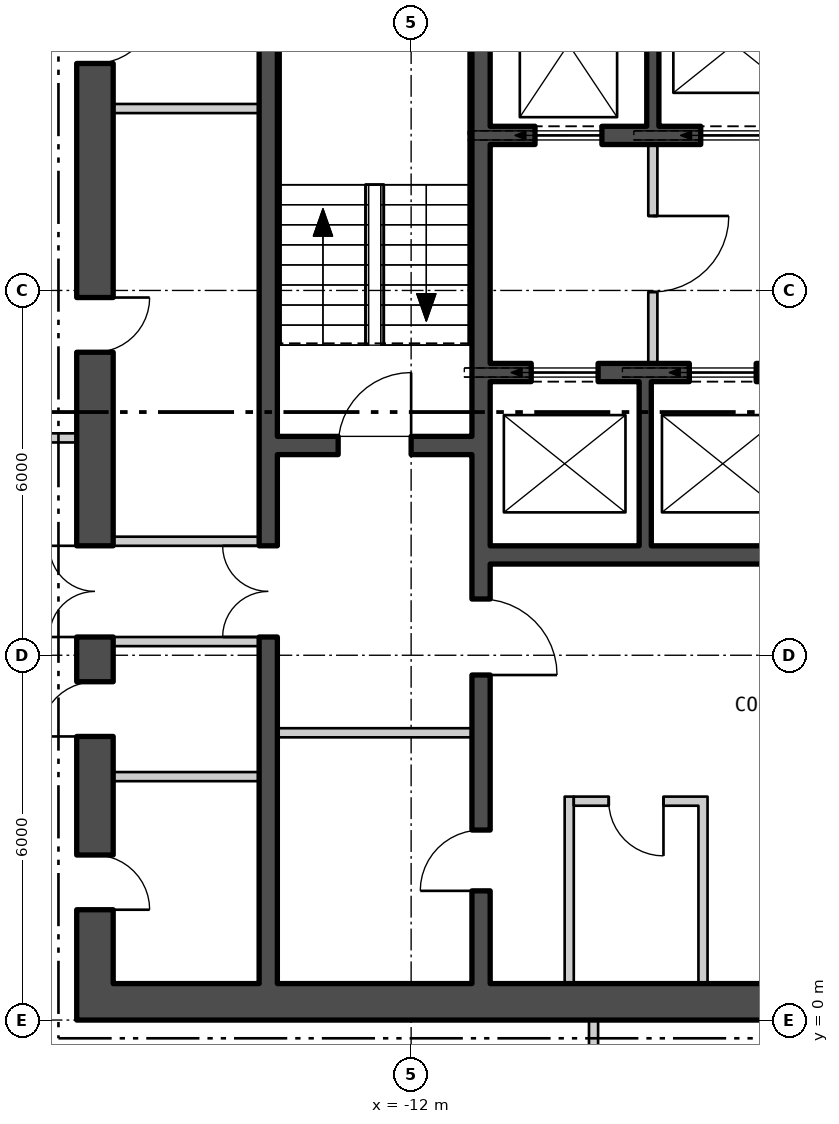
"""IFC4 building model, lengths in metres.
Left out: names, types, materials, properties, quantities, classifications, styles, units other than length and angle.
Written with IfcOpenShell. Run it as: python <this file> out.ifc"""

import sys

from ifc_helpers import new_model, si_unit, direction, frame, frame_2d, origin, place, context, subcontext, project, spatial, rectangle, extrude, element, fill, save


model = new_model("IFC4")
c1 = context("Model", 3, precision=1e-05, world=origin(), true_north=direction((0.0, 1.0)))
c2 = subcontext(c1, "Body", "Model", "MODEL_VIEW")
j1 = project(units=[si_unit("LENGTHUNIT", "METRE"), si_unit("PLANEANGLEUNIT", "RADIAN")], contexts=[c1])
p1 = place(None, origin())
s1 = spatial("IfcSite", under=j1, at=p1, CompositionType="ELEMENT")
p2 = place(p1, origin())
s2 = spatial("IfcBuilding", under=s1, at=p2, CompositionType="ELEMENT")
p3 = place(p2, frame((0.0, 0.0, 8.4)))
s3 = spatial("IfcBuildingStorey", under=s2, at=p3, CompositionType="ELEMENT", Elevation=8.4)
p4 = place(p3, frame((-17.5, 0.3, 0.0), z_axis=(0.0, 0.0, 1.0), x_axis=(1.0, 0.0, 0.0)))
e1 = element("IfcWall", 1, at=p4, inside=s3, PredefinedType="SHEAR", context=c2, shape_type="SweptSolid", body=[
    extrude(rectangle(XDim=35.0, YDim=0.6, at=frame_2d((17.5, 0.0))), origin(), (0.0, 0.0, 1.0), 4.88),
])
p5 = place(p4, frame((12.0, 0.0, 0.0)))
e2 = element("IfcOpeningElement", 2, at=p5, cuts=e1, PredefinedType="OPENING", context=c2, shape_type="SweptSolid", body=[
    extrude(rectangle(XDim=1.8, YDim=2.4, at=frame_2d((0.9, 1.2))), frame((0.0, 0.31, 0.0), z_axis=(0.0, -1.0, 0.0), x_axis=(1.0, 0.0, 0.0)), (0.0, 0.0, 1.0), 0.62),
])
p6 = place(p4, frame((22.0, 0.0, 0.0)))
e3 = element("IfcOpeningElement", 3, at=p6, cuts=e1, PredefinedType="OPENING", context=c2, shape_type="SweptSolid", body=[
    extrude(rectangle(XDim=1.8, YDim=2.4, at=frame_2d((0.9, 1.2))), frame((0.0, 0.31, 0.0), z_axis=(0.0, -1.0, 0.0), x_axis=(1.0, 0.0, 0.0)), (0.0, 0.0, 1.0), 0.62),
])
p7 = place(p3, frame((-17.2, 0.6, 0.0), z_axis=(0.0, 0.0, 1.0), x_axis=(0.0, 1.0, 0.0)))
e4 = element("IfcWall", 4, at=p7, inside=s3, PredefinedType="SHEAR", context=c2, shape_type="SweptSolid", body=[
    extrude(rectangle(XDim=16.8, YDim=0.6, at=frame_2d((8.4, 0.0))), origin(), (0.0, 0.0, 1.0), 4.88),
])
p8 = place(p7, frame((5.7, 0.0, 0.0)))
e5 = element("IfcOpeningElement", 5, at=p8, cuts=e4, PredefinedType="OPENING", context=c2, shape_type="SweptSolid", body=[
    extrude(rectangle(XDim=1.5, YDim=2.1, at=frame_2d((0.75, 1.05))), frame((0.0, 0.31, 0.0), z_axis=(0.0, -1.0, 0.0), x_axis=(1.0, 0.0, 0.0)), (0.0, 0.0, 1.0), 0.62),
])
p9 = place(p7, frame((1.214, 0.0, 0.0)))
e6 = element("IfcOpeningElement", 6, at=p9, cuts=e4, PredefinedType="OPENING", context=c2, shape_type="SweptSolid", body=[
    extrude(rectangle(XDim=0.9, YDim=2.1, at=frame_2d((0.45, 1.05))), frame((0.0, 0.31, 0.0), z_axis=(0.0, -1.0, 0.0), x_axis=(1.0, 0.0, 0.0)), (0.0, 0.0, 1.0), 0.62),
])
p10 = place(p7, frame((4.064, 0.0, 0.0)))
e7 = element("IfcOpeningElement", 7, at=p10, cuts=e4, PredefinedType="OPENING", context=c2, shape_type="SweptSolid", body=[
    extrude(rectangle(XDim=0.9, YDim=2.1, at=frame_2d((0.45, 1.05))), frame((0.0, 0.31, 0.0), z_axis=(0.0, -1.0, 0.0), x_axis=(1.0, 0.0, 0.0)), (0.0, 0.0, 1.0), 0.62),
])
p11 = place(p7, frame((10.383, 0.0, 0.0)))
e8 = element("IfcOpeningElement", 8, at=p11, cuts=e4, PredefinedType="OPENING", context=c2, shape_type="SweptSolid", body=[
    extrude(rectangle(XDim=0.9, YDim=2.1, at=frame_2d((0.45, 1.05))), frame((0.0, 0.31, 0.0), z_axis=(0.0, -1.0, 0.0), x_axis=(1.0, 0.0, 0.0)), (0.0, 0.0, 1.0), 0.62),
])
p12 = place(p7, frame((15.133, 0.0, 0.0)))
e9 = element("IfcOpeningElement", 9, at=p12, cuts=e4, PredefinedType="OPENING", context=c2, shape_type="SweptSolid", body=[
    extrude(rectangle(XDim=1.0, YDim=2.1, at=frame_2d((0.5, 1.05))), frame((0.0, 0.31, 0.0), z_axis=(0.0, -1.0, 0.0), x_axis=(1.0, 0.0, 0.0)), (0.0, 0.0, 1.0), 0.62),
])
p13 = place(p3, frame((-10.85, 0.6, 0.0), z_axis=(0.0, 0.0, 1.0), x_axis=(0.0, 1.0, 0.0)))
e10 = element("IfcWall", 10, at=p13, inside=s3, PredefinedType="SHEAR", context=c2, shape_type="SweptSolid", body=[
    extrude(rectangle(XDim=16.8, YDim=0.3, at=frame_2d((8.4, 0.0))), origin(), (0.0, 0.0, 1.0), 4.88),
])
p14 = place(p13, frame((5.075, 0.0, 0.0)))
e11 = element("IfcOpeningElement", 11, at=p14, cuts=e10, PredefinedType="OPENING", context=c2, shape_type="SweptSolid", body=[
    extrude(rectangle(XDim=1.25, YDim=2.1, at=frame_2d((0.625, 1.05))), frame((0.0, 0.16, 0.0), z_axis=(0.0, -1.0, 0.0), x_axis=(1.0, 0.0, 0.0)), (0.0, 0.0, 1.0), 0.32),
])
p15 = place(p13, frame((1.525, 0.0, 0.0)))
e12 = element("IfcOpeningElement", 12, at=p15, cuts=e10, PredefinedType="OPENING", context=c2, shape_type="SweptSolid", body=[
    extrude(rectangle(XDim=1.0, YDim=2.1, at=frame_2d((0.5, 1.05))), frame((0.0, 0.16, 0.0), z_axis=(0.0, -1.0, 0.0), x_axis=(1.0, 0.0, 0.0)), (0.0, 0.0, 1.0), 0.32),
])
p16 = place(p3, frame((-14.35, 0.6, 0.0), z_axis=(0.0, 0.0, 1.0), x_axis=(0.0, 1.0, 0.0)))
e13 = element("IfcWall", 13, at=p16, inside=s3, PredefinedType="SHEAR", context=c2, shape_type="SweptSolid", body=[
    extrude(rectangle(XDim=16.8, YDim=0.3, at=frame_2d((8.4, 0.0))), origin(), (0.0, 0.0, 1.0), 4.88),
])
p17 = place(p16, frame((5.7, 0.0, 0.0)))
e14 = element("IfcOpeningElement", 14, at=p17, cuts=e13, PredefinedType="OPENING", context=c2, shape_type="SweptSolid", body=[
    extrude(rectangle(XDim=1.5, YDim=2.1, at=frame_2d((0.75, 1.05))), frame((0.0, 0.16, 0.0), z_axis=(0.0, -1.0, 0.0), x_axis=(1.0, 0.0, 0.0)), (0.0, 0.0, 1.0), 0.32),
])
p18 = place(p3, frame((-14.2, 9.45, 0.0), z_axis=(0.0, 0.0, 1.0), x_axis=(1.0, 0.0, 0.0)))
e15 = element("IfcWall", 15, at=p18, inside=s3, PredefinedType="SHEAR", context=c2, shape_type="SweptSolid", body=[
    extrude(rectangle(XDim=3.2, YDim=0.3, at=frame_2d((1.6, 0.0))), origin(), (0.0, 0.0, 1.0), 4.88),
])
p19 = place(p18, frame((1.0, 0.0, 0.0)))
e16 = element("IfcOpeningElement", 16, at=p19, cuts=e15, PredefinedType="OPENING", context=c2, shape_type="SweptSolid", body=[
    extrude(rectangle(XDim=1.2, YDim=2.1, at=frame_2d((0.6, 1.05))), frame((0.0, 0.16, 0.0), z_axis=(0.0, -1.0, 0.0), x_axis=(1.0, 0.0, 0.0)), (0.0, 0.0, 1.0), 0.32),
])
p20 = place(p3, frame((-10.7, 14.55, 0.0), z_axis=(0.0, 0.0, 1.0), x_axis=(1.0, 0.0, 0.0)))
e17 = element("IfcWall", 17, at=p20, inside=s3, PredefinedType="SHEAR", context=c2, shape_type="SweptSolid", body=[
    extrude(rectangle(XDim=21.4, YDim=0.3, at=frame_2d((10.7, 0.0))), origin(), (0.0, 0.0, 1.0), 4.88),
])
p21 = place(p20, frame((0.738, 0.0, 0.0)))
e18 = element("IfcOpeningElement", 18, at=p21, cuts=e17, PredefinedType="OPENING", context=c2, shape_type="SweptSolid", body=[
    extrude(rectangle(XDim=1.1, YDim=2.1, at=frame_2d((0.55, 1.05))), frame((0.0, 0.16, 0.0), z_axis=(0.0, -1.0, 0.0), x_axis=(1.0, 0.0, 0.0)), (0.0, 0.0, 1.0), 0.32),
])
p22 = place(p20, frame((3.462, 0.0, 0.0)))
e19 = element("IfcOpeningElement", 19, at=p22, cuts=e17, PredefinedType="OPENING", context=c2, shape_type="SweptSolid", body=[
    extrude(rectangle(XDim=1.1, YDim=2.1, at=frame_2d((0.55, 1.05))), frame((0.0, 0.16, 0.0), z_axis=(0.0, -1.0, 0.0), x_axis=(1.0, 0.0, 0.0)), (0.0, 0.0, 1.0), 0.32),
])
p23 = place(p20, frame((6.138, 0.0, 0.0)))
e20 = element("IfcOpeningElement", 20, at=p23, cuts=e17, PredefinedType="OPENING", context=c2, shape_type="SweptSolid", body=[
    extrude(rectangle(XDim=1.1, YDim=2.1, at=frame_2d((0.55, 1.05))), frame((0.0, 0.16, 0.0), z_axis=(0.0, -1.0, 0.0), x_axis=(1.0, 0.0, 0.0)), (0.0, 0.0, 1.0), 0.32),
])
p24 = place(p20, frame((8.812, 0.0, 0.0)))
e21 = element("IfcOpeningElement", 21, at=p24, cuts=e17, PredefinedType="OPENING", context=c2, shape_type="SweptSolid", body=[
    extrude(rectangle(XDim=1.1, YDim=2.1, at=frame_2d((0.55, 1.05))), frame((0.0, 0.16, 0.0), z_axis=(0.0, -1.0, 0.0), x_axis=(1.0, 0.0, 0.0)), (0.0, 0.0, 1.0), 0.32),
])
p25 = place(p20, frame((14.162, 0.0, 0.0)))
e22 = element("IfcOpeningElement", 22, at=p25, cuts=e17, PredefinedType="OPENING", context=c2, shape_type="SweptSolid", body=[
    extrude(rectangle(XDim=1.1, YDim=2.1, at=frame_2d((0.55, 1.05))), frame((0.0, 0.16, 0.0), z_axis=(0.0, -1.0, 0.0), x_axis=(1.0, 0.0, 0.0)), (0.0, 0.0, 1.0), 0.32),
])
p26 = place(p20, frame((16.837, 0.0, 0.0)))
e23 = element("IfcOpeningElement", 23, at=p26, cuts=e17, PredefinedType="OPENING", context=c2, shape_type="SweptSolid", body=[
    extrude(rectangle(XDim=1.1, YDim=2.1, at=frame_2d((0.55, 1.05))), frame((0.0, 0.16, 0.0), z_axis=(0.0, -1.0, 0.0), x_axis=(1.0, 0.0, 0.0)), (0.0, 0.0, 1.0), 0.32),
])
p27 = place(p20, frame((19.562, 0.0, 0.0)))
e24 = element("IfcOpeningElement", 24, at=p27, cuts=e17, PredefinedType="OPENING", context=c2, shape_type="SweptSolid", body=[
    extrude(rectangle(XDim=1.1, YDim=2.1, at=frame_2d((0.55, 1.05))), frame((0.0, 0.16, 0.0), z_axis=(0.0, -1.0, 0.0), x_axis=(1.0, 0.0, 0.0)), (0.0, 0.0, 1.0), 0.32),
])
p28 = place(p3, frame((-10.7, 10.65, 0.0), z_axis=(0.0, 0.0, 1.0), x_axis=(1.0, 0.0, 0.0)))
e25 = element("IfcWall", 25, at=p28, inside=s3, PredefinedType="SHEAR", context=c2, shape_type="SweptSolid", body=[
    extrude(rectangle(XDim=10.3, YDim=0.3, at=frame_2d((5.15, 0.0))), origin(), (0.0, 0.0, 1.0), 4.88),
])
p29 = place(p28, frame((0.675, 0.0, 0.0)))
e26 = element("IfcOpeningElement", 26, at=p29, cuts=e25, PredefinedType="OPENING", context=c2, shape_type="SweptSolid", body=[
    extrude(rectangle(XDim=1.1, YDim=2.1, at=frame_2d((0.55, 1.05))), frame((0.0, 0.16, 0.0), z_axis=(0.0, -1.0, 0.0), x_axis=(1.0, 0.0, 0.0)), (0.0, 0.0, 1.0), 0.32),
])
p30 = place(p28, frame((3.275, 0.0, 0.0)))
e27 = element("IfcOpeningElement", 27, at=p30, cuts=e25, PredefinedType="OPENING", context=c2, shape_type="SweptSolid", body=[
    extrude(rectangle(XDim=1.1, YDim=2.1, at=frame_2d((0.55, 1.05))), frame((0.0, 0.16, 0.0), z_axis=(0.0, -1.0, 0.0), x_axis=(1.0, 0.0, 0.0)), (0.0, 0.0, 1.0), 0.32),
])
p31 = place(p28, frame((5.825, 0.0, 0.0)))
e28 = element("IfcOpeningElement", 28, at=p31, cuts=e25, PredefinedType="OPENING", context=c2, shape_type="SweptSolid", body=[
    extrude(rectangle(XDim=1.1, YDim=2.1, at=frame_2d((0.55, 1.05))), frame((0.0, 0.16, 0.0), z_axis=(0.0, -1.0, 0.0), x_axis=(1.0, 0.0, 0.0)), (0.0, 0.0, 1.0), 0.32),
])
p32 = place(p28, frame((8.375, 0.0, 0.0)))
e29 = element("IfcOpeningElement", 29, at=p32, cuts=e25, PredefinedType="OPENING", context=c2, shape_type="SweptSolid", body=[
    extrude(rectangle(XDim=1.1, YDim=2.1, at=frame_2d((0.55, 1.05))), frame((0.0, 0.16, 0.0), z_axis=(0.0, -1.0, 0.0), x_axis=(1.0, 0.0, 0.0)), (0.0, 0.0, 1.0), 0.32),
])
p33 = place(p3, frame((-10.7, 7.65, 0.0), z_axis=(0.0, 0.0, 1.0), x_axis=(1.0, 0.0, 0.0)))
e30 = element("IfcWall", 30, at=p33, inside=s3, PredefinedType="SHEAR", context=c2, shape_type="SweptSolid", body=[
    extrude(rectangle(XDim=10.3, YDim=0.3, at=frame_2d((5.15, 0.0))), origin(), (0.0, 0.0, 1.0), 4.88),
])
for number, where, z_axis, x_axis in (
    (31, (-8.025, 14.7, 0.0), (0.0, 0.0, 1.0), (0.0, 1.0, 0.0)),
    (32, (-8.15, 7.8, 0.0), (0.0, 0.0, 1.0), (0.0, 1.0, 0.0)),
):
    element("IfcWall", number, at=place(p3, frame(where, z_axis=z_axis, x_axis=x_axis)), inside=s3, PredefinedType="SHEAR", context=c2, shape_type="SweptSolid", body=[
        extrude(rectangle(XDim=2.7, YDim=0.2, at=frame_2d((1.35, 0.0))), origin(), (0.0, 0.0, 1.0), 4.88),
    ])
p34 = place(p3, frame((-8.025, 10.8, 0.0), z_axis=(0.0, 0.0, 1.0), x_axis=(0.0, 1.0, 0.0)))
e33 = element("IfcWall", 33, at=p34, inside=s3, PredefinedType="PARTITIONING", context=c2, shape_type="SweptSolid", body=[
    extrude(rectangle(XDim=3.6, YDim=0.15, at=frame_2d((1.8, 0.0))), origin(), (0.0, 0.0, 1.0), 4.88),
])
p35 = place(p34, frame((1.175, 0.0, 0.0)))
e34 = element("IfcOpeningElement", 34, at=p35, cuts=e33, PredefinedType="OPENING", context=c2, shape_type="SweptSolid", body=[
    extrude(rectangle(XDim=1.25, YDim=2.1, at=frame_2d((0.625, 1.05))), frame((0.0, 0.085, 0.0), z_axis=(0.0, -1.0, 0.0), x_axis=(1.0, 0.0, 0.0)), (0.0, 0.0, 1.0), 0.17),
])
p36 = place(p3, frame((-14.2, 4.725, 0.0), z_axis=(0.0, 0.0, 1.0), x_axis=(1.0, 0.0, 0.0)))
e35 = element("IfcWall", 35, at=p36, inside=s3, PredefinedType="PARTITIONING", context=c2, shape_type="SweptSolid", body=[
    extrude(rectangle(XDim=3.2, YDim=0.15, at=frame_2d((1.6, 0.0))), origin(), (0.0, 0.0, 1.0), 4.88),
])
for number, where, z_axis, x_axis in (
    (36, (-16.9, 6.225, 0.0), (0.0, 0.0, 1.0), (1.0, 0.0, 0.0)),
    (37, (-16.9, 7.875, 0.0), (0.0, 0.0, 1.0), (1.0, 0.0, 0.0)),
    (38, (-16.9, 4.004, 0.0), (0.0, 0.0, 1.0), (1.0, 0.0, 0.0)),
    (39, (-16.9, 14.992, 0.0), (0.0, 0.0, 1.0), (1.0, 0.0, 0.0)),
):
    element("IfcWall", number, at=place(p3, frame(where, z_axis=z_axis, x_axis=x_axis)), inside=s3, PredefinedType="PARTITIONING", context=c2, shape_type="SweptSolid", body=[
        extrude(rectangle(XDim=2.4, YDim=0.15, at=frame_2d((1.2, 0.0))), origin(), (0.0, 0.0, 1.0), 4.88),
    ])
for number, where, z_axis, x_axis in (
    (40, (-9.4, 0.6, 0.0), (0.0, 0.0, 1.0), (0.0, 1.0, 0.0)),
    (41, (-7.2, 0.6, 0.0), (0.0, 0.0, 1.0), (0.0, 1.0, 0.0)),
):
    element("IfcWall", number, at=place(p3, frame(where, z_axis=z_axis, x_axis=x_axis)), inside=s3, PredefinedType="PARTITIONING", context=c2, shape_type="SweptSolid", body=[
        extrude(rectangle(XDim=3.075, YDim=0.15, at=frame_2d((1.538, 0.0))), origin(), (0.0, 0.0, 1.0), 4.88),
    ])
p37 = place(p3, frame((-9.325, 3.6, 0.0), z_axis=(0.0, 0.0, 1.0), x_axis=(1.0, 0.0, 0.0)))
e42 = element("IfcWall", 42, at=p37, inside=s3, PredefinedType="PARTITIONING", context=c2, shape_type="SweptSolid", body=[
    extrude(rectangle(XDim=2.05, YDim=0.15, at=frame_2d((1.025, 0.0))), origin(), (0.0, 0.0, 1.0), 4.88),
])
p38 = place(p37, frame((0.575, 0.0, 0.0)))
e43 = element("IfcOpeningElement", 43, at=p38, cuts=e42, PredefinedType="OPENING", context=c2, shape_type="SweptSolid", body=[
    extrude(rectangle(XDim=0.9, YDim=2.1, at=frame_2d((0.45, 1.05))), frame((0.0, 0.085, 0.0), z_axis=(0.0, -1.0, 0.0), x_axis=(1.0, 0.0, 0.0)), (0.0, 0.0, 1.0), 0.17),
])
p39 = place(p3, frame((-19.825, 9.575, 0.0), z_axis=(0.0, 0.0, 1.0), x_axis=(1.0, 0.0, 0.0)))
e44 = element("IfcWall", 44, at=p39, inside=s3, PredefinedType="PARTITIONING", context=c2, shape_type="SweptSolid", body=[
    extrude(rectangle(XDim=2.325, YDim=0.15, at=frame_2d((1.163, 0.0))), origin(), (0.0, 0.0, 1.0), 4.88),
])
p40 = place(p39, frame((0.662, 0.0, 0.0)))
e45 = element("IfcOpeningElement", 45, at=p40, cuts=e44, PredefinedType="OPENING", context=c2, shape_type="SweptSolid", body=[
    extrude(rectangle(XDim=1.0, YDim=2.1, at=frame_2d((0.5, 1.05))), frame((0.0, 0.085, 0.0), z_axis=(0.0, -1.0, 0.0), x_axis=(1.0, 0.0, 0.0)), (0.0, 0.0, 1.0), 0.17),
])
p41 = place(p3, frame((-9.0, -13.675, 0.0), z_axis=(0.0, 0.0, 1.0), x_axis=(0.0, 1.0, 0.0)))
e46 = element("IfcWall", 46, at=p41, inside=s3, PredefinedType="PARTITIONING", context=c2, shape_type="SweptSolid", body=[
    extrude(rectangle(XDim=13.675, YDim=0.15, at=frame_2d((6.838, 0.0))), origin(), (0.0, 0.0, 1.0), 4.88),
])
p42 = place(p41, frame((11.969, 0.0, 0.0)))
e47 = element("IfcOpeningElement", 47, at=p42, cuts=e46, PredefinedType="OPENING", context=c2, shape_type="SweptSolid", body=[
    extrude(rectangle(XDim=1.0, YDim=2.1, at=frame_2d((0.5, 1.05))), frame((0.0, 0.085, 0.0), z_axis=(0.0, -1.0, 0.0), x_axis=(1.0, 0.0, 0.0)), (0.0, 0.0, 1.0), 0.17),
])
p43 = place(p21, origin())
e48 = element("IfcDoor", 48, at=p43, inside=s3, OperationType="SLIDING_TO_LEFT", PredefinedType="DOOR", context=c2, shape_type="SweptSolid", body=[
    extrude(rectangle(XDim=1.1, YDim=2.1, at=frame_2d((0.55, 1.05))), frame((0.0, 0.025, 0.0), z_axis=(0.0, -1.0, 0.0), x_axis=(1.0, 0.0, 0.0)), (0.0, 0.0, 1.0), 0.05),
])
fill(e18, e48)
p44 = place(p22, origin())
e49 = element("IfcDoor", 49, at=p44, inside=s3, OperationType="SLIDING_TO_LEFT", PredefinedType="DOOR", context=c2, shape_type="SweptSolid", body=[
    extrude(rectangle(XDim=1.1, YDim=2.1, at=frame_2d((0.55, 1.05))), frame((0.0, 0.025, 0.0), z_axis=(0.0, -1.0, 0.0), x_axis=(1.0, 0.0, 0.0)), (0.0, 0.0, 1.0), 0.05),
])
fill(e19, e49)
p45 = place(p29, origin())
e50 = element("IfcDoor", 50, at=p45, inside=s3, OperationType="SLIDING_TO_LEFT", PredefinedType="DOOR", context=c2, shape_type="SweptSolid", body=[
    extrude(rectangle(XDim=1.1, YDim=2.1, at=frame_2d((0.55, 1.05))), frame((0.0, 0.025, 0.0), z_axis=(0.0, -1.0, 0.0), x_axis=(1.0, 0.0, 0.0)), (0.0, 0.0, 1.0), 0.05),
])
fill(e26, e50)
p46 = place(p30, origin())
e51 = element("IfcDoor", 51, at=p46, inside=s3, OperationType="SLIDING_TO_LEFT", PredefinedType="DOOR", context=c2, shape_type="SweptSolid", body=[
    extrude(rectangle(XDim=1.1, YDim=2.1, at=frame_2d((0.55, 1.05))), frame((0.0, 0.025, 0.0), z_axis=(0.0, -1.0, 0.0), x_axis=(1.0, 0.0, 0.0)), (0.0, 0.0, 1.0), 0.05),
])
fill(e27, e51)
p47 = place(p35, origin())
e52 = element("IfcDoor", 52, at=p47, inside=s3, OperationType="SINGLE_SWING_RIGHT", PredefinedType="DOOR", context=c2, shape_type="SweptSolid", body=[
    extrude(rectangle(XDim=1.25, YDim=2.1, at=frame_2d((0.625, 1.05))), frame((0.0, 0.025, 0.0), z_axis=(0.0, -1.0, 0.0), x_axis=(1.0, 0.0, 0.0)), (0.0, 0.0, 1.0), 0.05),
])
fill(e34, e52)
p48 = place(p19, origin())
e53 = element("IfcDoor", 53, at=p48, inside=s3, OperationType="SINGLE_SWING_LEFT", PredefinedType="DOOR", context=c2, shape_type="SweptSolid", body=[
    extrude(rectangle(XDim=1.2, YDim=2.1, at=frame_2d((0.6, 1.05))), frame((0.0, 0.025, 0.0), z_axis=(0.0, -1.0, 0.0), x_axis=(1.0, 0.0, 0.0)), (0.0, 0.0, 1.0), 0.05),
])
fill(e16, e53)
p49 = place(p14, origin())
e54 = element("IfcDoor", 54, at=p49, inside=s3, OperationType="SINGLE_SWING_LEFT", PredefinedType="DOOR", context=c2, shape_type="SweptSolid", body=[
    extrude(rectangle(XDim=1.25, YDim=2.1, at=frame_2d((0.625, 1.05))), frame((0.0, 0.025, 0.0), z_axis=(0.0, -1.0, 0.0), x_axis=(1.0, 0.0, 0.0)), (0.0, 0.0, 1.0), 0.05),
])
fill(e11, e54)
p50 = place(p15, origin())
e55 = element("IfcDoor", 55, at=p50, inside=s3, OperationType="SINGLE_SWING_RIGHT", PredefinedType="DOOR", context=c2, shape_type="SweptSolid", body=[
    extrude(rectangle(XDim=1.0, YDim=2.1, at=frame_2d((0.5, 1.05))), frame((0.0, 0.025, 0.0), z_axis=(0.0, -1.0, 0.0), x_axis=(1.0, 0.0, 0.0)), (0.0, 0.0, 1.0), 0.05),
])
fill(e12, e55)
p51 = place(p17, origin())
e56 = element("IfcDoor", 56, at=p51, inside=s3, OperationType="DOUBLE_DOOR_SINGLE_SWING", PredefinedType="DOOR", context=c2, shape_type="SweptSolid", body=[
    extrude(rectangle(XDim=1.5, YDim=2.1, at=frame_2d((0.75, 1.05))), frame((0.0, 0.025, 0.0), z_axis=(0.0, -1.0, 0.0), x_axis=(1.0, 0.0, 0.0)), (0.0, 0.0, 1.0), 0.05),
])
fill(e14, e56)
p52 = place(p8, origin())
e57 = element("IfcDoor", 57, at=p52, inside=s3, OperationType="DOUBLE_DOOR_SINGLE_SWING", PredefinedType="DOOR", context=c2, shape_type="SweptSolid", body=[
    extrude(rectangle(XDim=1.5, YDim=2.1, at=frame_2d((0.75, 1.05))), frame((0.0, 0.025, 0.0), z_axis=(0.0, -1.0, 0.0), x_axis=(1.0, 0.0, 0.0)), (0.0, 0.0, 1.0), 0.05),
])
fill(e5, e57)
p53 = place(p9, origin())
e58 = element("IfcDoor", 58, at=p53, inside=s3, OperationType="SINGLE_SWING_LEFT", PredefinedType="DOOR", context=c2, shape_type="SweptSolid", body=[
    extrude(rectangle(XDim=0.9, YDim=2.1, at=frame_2d((0.45, 1.05))), frame((0.0, 0.025, 0.0), z_axis=(0.0, -1.0, 0.0), x_axis=(1.0, 0.0, 0.0)), (0.0, 0.0, 1.0), 0.05),
])
fill(e6, e58)
p54 = place(p10, origin())
e59 = element("IfcDoor", 59, at=p54, inside=s3, OperationType="SINGLE_SWING_RIGHT", PredefinedType="DOOR", context=c2, shape_type="SweptSolid", body=[
    extrude(rectangle(XDim=0.9, YDim=2.1, at=frame_2d((0.45, 1.05))), frame((0.0, 0.025, 0.0), z_axis=(0.0, -1.0, 0.0), x_axis=(1.0, 0.0, 0.0)), (0.0, 0.0, 1.0), 0.05),
])
fill(e7, e59)
p55 = place(p11, origin())
e60 = element("IfcDoor", 60, at=p55, inside=s3, OperationType="SINGLE_SWING_RIGHT", PredefinedType="DOOR", context=c2, shape_type="SweptSolid", body=[
    extrude(rectangle(XDim=0.9, YDim=2.1, at=frame_2d((0.45, 1.05))), frame((0.0, 0.025, 0.0), z_axis=(0.0, -1.0, 0.0), x_axis=(1.0, 0.0, 0.0)), (0.0, 0.0, 1.0), 0.05),
])
fill(e8, e60)
p56 = place(p12, origin())
e61 = element("IfcDoor", 61, at=p56, inside=s3, OperationType="SINGLE_SWING_RIGHT", PredefinedType="DOOR", context=c2, shape_type="SweptSolid", body=[
    extrude(rectangle(XDim=1.0, YDim=2.1, at=frame_2d((0.5, 1.05))), frame((0.0, 0.025, 0.0), z_axis=(0.0, -1.0, 0.0), x_axis=(1.0, 0.0, 0.0)), (0.0, 0.0, 1.0), 0.05),
])
fill(e9, e61)
p57 = place(p38, origin())
e62 = element("IfcDoor", 62, at=p57, inside=s3, OperationType="SINGLE_SWING_RIGHT", PredefinedType="DOOR", context=c2, shape_type="SweptSolid", body=[
    extrude(rectangle(XDim=0.9, YDim=2.1, at=frame_2d((0.45, 1.05))), frame((0.0, 0.025, 0.0), z_axis=(0.0, -1.0, 0.0), x_axis=(1.0, 0.0, 0.0)), (0.0, 0.0, 1.0), 0.05),
])
fill(e43, e62)
save(model, sys.argv[1])
